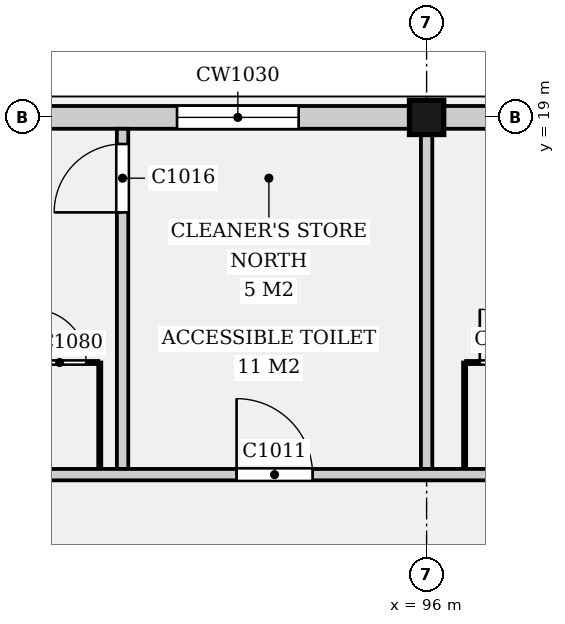
"""IFC4 building model, lengths in metres.
Left out: names, types, materials, properties, quantities, classifications, styles, units other than length and angle.
Written with IfcOpenShell. Run it as: python <this file> out.ifc"""

import sys

from ifc_helpers import new_model, si_unit, direction, frame, frame_2d, origin, origin_2d, place, context, subcontext, project, spatial, rectangle, extrude, element, fill, save


model = new_model("IFC4")
c1 = context("Model", 3, precision=1e-05, world=origin(), true_north=direction((0.0, 1.0)))
c2 = subcontext(c1, "Body", "Model", "MODEL_VIEW")
j1 = project(units=[si_unit("LENGTHUNIT", "METRE"), si_unit("PLANEANGLEUNIT", "RADIAN")], contexts=[c1])
p1 = place(None, origin())
s1 = spatial("IfcSite", under=j1, at=p1, CompositionType="ELEMENT")
p2 = place(p1, origin())
s2 = spatial("IfcBuilding", under=s1, at=p2, CompositionType="ELEMENT")
p3 = place(p2, frame((0.0, 0.0, 5.0)))
s3 = spatial("IfcBuildingStorey", under=s2, at=p3, CompositionType="ELEMENT", Elevation=5.0)
p4 = place(p3, frame((96.0, 19.0, 0.0), z_axis=(0.0, 0.0, 1.0), x_axis=(1.0, 0.0, 0.0)))
e1 = element("IfcColumn", 1, at=p4, inside=s3, PredefinedType="COLUMN", context=c2, shape_type="SweptSolid", body=[
    extrude(rectangle(XDim=0.45, YDim=0.45, at=origin_2d()), origin(), (0.0, 0.0, 1.0), 4.4),
])
p5 = place(p3, frame((84.225, 19.0, 0.0), z_axis=(0.0, 0.0, 1.0), x_axis=(1.0, 0.0, 0.0)))
e2 = element("IfcWall", 2, at=p5, inside=s3, PredefinedType="ELEMENTEDWALL", context=c2, shape_type="SweptSolid", body=[
    extrude(rectangle(XDim=11.55, YDim=0.3, at=frame_2d((5.775, 0.0))), origin(), (0.0, 0.0, 1.0), 3.98),
])
p6 = place(p5, frame((1.458, 0.0, 1.4)))
e3 = element("IfcOpeningElement", 3, at=p6, cuts=e2, PredefinedType="OPENING", context=c2, shape_type="SweptSolid", body=[
    extrude(rectangle(XDim=1.6, YDim=1.2, at=frame_2d((0.8, 0.6))), frame((0.0, 0.16, 0.0), z_axis=(0.0, -1.0, 0.0), x_axis=(1.0, 0.0, 0.0)), (0.0, 0.0, 1.0), 0.32),
])
p7 = place(p5, frame((4.975, 0.0, 1.4)))
e4 = element("IfcOpeningElement", 4, at=p7, cuts=e2, PredefinedType="OPENING", context=c2, shape_type="SweptSolid", body=[
    extrude(rectangle(XDim=1.6, YDim=1.2, at=frame_2d((0.8, 0.6))), frame((0.0, 0.16, 0.0), z_axis=(0.0, -1.0, 0.0), x_axis=(1.0, 0.0, 0.0)), (0.0, 0.0, 1.0), 0.32),
])
p8 = place(p5, frame((8.492, 0.0, 1.4)))
e5 = element("IfcOpeningElement", 5, at=p8, cuts=e2, PredefinedType="OPENING", context=c2, shape_type="SweptSolid", body=[
    extrude(rectangle(XDim=1.6, YDim=1.2, at=frame_2d((0.8, 0.6))), frame((0.0, 0.16, 0.0), z_axis=(0.0, -1.0, 0.0), x_axis=(1.0, 0.0, 0.0)), (0.0, 0.0, 1.0), 0.32),
])
p9 = place(p3, frame((96.225, 19.0, 0.0), z_axis=(0.0, 0.0, 1.0), x_axis=(1.0, 0.0, 0.0)))
e6 = element("IfcWall", 6, at=p9, inside=s3, PredefinedType="ELEMENTEDWALL", context=c2, shape_type="SweptSolid", body=[
    extrude(rectangle(XDim=11.55, YDim=0.3, at=frame_2d((5.775, 0.0))), origin(), (0.0, 0.0, 1.0), 3.98),
])
p10 = place(p9, frame((1.458, 0.0, 1.4)))
e7 = element("IfcOpeningElement", 7, at=p10, cuts=e6, PredefinedType="OPENING", context=c2, shape_type="SweptSolid", body=[
    extrude(rectangle(XDim=1.6, YDim=1.2, at=frame_2d((0.8, 0.6))), frame((0.0, 0.16, 0.0), z_axis=(0.0, -1.0, 0.0), x_axis=(1.0, 0.0, 0.0)), (0.0, 0.0, 1.0), 0.32),
])
p11 = place(p9, frame((4.975, 0.0, 1.4)))
e8 = element("IfcOpeningElement", 8, at=p11, cuts=e6, PredefinedType="OPENING", context=c2, shape_type="SweptSolid", body=[
    extrude(rectangle(XDim=1.6, YDim=1.2, at=frame_2d((0.8, 0.6))), frame((0.0, 0.16, 0.0), z_axis=(0.0, -1.0, 0.0), x_axis=(1.0, 0.0, 0.0)), (0.0, 0.0, 1.0), 0.32),
])
p12 = place(p9, frame((8.492, 0.0, 1.4)))
e9 = element("IfcOpeningElement", 9, at=p12, cuts=e6, PredefinedType="OPENING", context=c2, shape_type="SweptSolid", body=[
    extrude(rectangle(XDim=1.6, YDim=1.2, at=frame_2d((0.8, 0.6))), frame((0.0, 0.16, 0.0), z_axis=(0.0, -1.0, 0.0), x_axis=(1.0, 0.0, 0.0)), (0.0, 0.0, 1.0), 0.32),
])
p13 = place(p3, frame((55.3, 14.3, 0.0), z_axis=(0.0, 0.0, 1.0), x_axis=(1.0, 0.0, 0.0)))
e10 = element("IfcWall", 10, at=p13, inside=s3, PredefinedType="PARTITIONING", context=c2, shape_type="SweptSolid", body=[
    extrude(rectangle(XDim=93.4, YDim=0.15, at=frame_2d((46.7, 0.0))), origin(), (0.0, 0.0, 1.0), 3.98),
])
p14 = place(p13, frame((15.8, 0.0, 0.0)))
e11 = element("IfcOpeningElement", 11, at=p14, cuts=e10, PredefinedType="OPENING", context=c2, shape_type="SweptSolid", body=[
    extrude(rectangle(XDim=1.8, YDim=2.4, at=frame_2d((0.9, 1.2))), frame((0.0, 0.085, 0.0), z_axis=(0.0, -1.0, 0.0), x_axis=(1.0, 0.0, 0.0)), (0.0, 0.0, 1.0), 0.17),
])
p15 = place(p13, frame((32.2, 0.0, 0.0)))
e12 = element("IfcOpeningElement", 12, at=p15, cuts=e10, PredefinedType="OPENING", context=c2, shape_type="SweptSolid", body=[
    extrude(rectangle(XDim=1.0, YDim=2.1, at=frame_2d((0.5, 1.05))), frame((0.0, 0.085, 0.0), z_axis=(0.0, -1.0, 0.0), x_axis=(1.0, 0.0, 0.0)), (0.0, 0.0, 1.0), 0.17),
])
p16 = place(p13, frame((38.2, 0.0, 0.0)))
e13 = element("IfcOpeningElement", 13, at=p16, cuts=e10, PredefinedType="OPENING", context=c2, shape_type="SweptSolid", body=[
    extrude(rectangle(XDim=1.0, YDim=2.1, at=frame_2d((0.5, 1.05))), frame((0.0, 0.085, 0.0), z_axis=(0.0, -1.0, 0.0), x_axis=(1.0, 0.0, 0.0)), (0.0, 0.0, 1.0), 0.17),
])
p17 = place(p13, frame((45.7, 0.0, 0.0)))
e14 = element("IfcOpeningElement", 14, at=p17, cuts=e10, PredefinedType="OPENING", context=c2, shape_type="SweptSolid", body=[
    extrude(rectangle(XDim=0.9, YDim=2.1, at=frame_2d((0.45, 1.05))), frame((0.0, 0.085, 0.0), z_axis=(0.0, -1.0, 0.0), x_axis=(1.0, 0.0, 0.0)), (0.0, 0.0, 1.0), 0.17),
])
p18 = place(p13, frame((58.2, 0.0, 0.0)))
e15 = element("IfcOpeningElement", 15, at=p18, cuts=e10, PredefinedType="OPENING", context=c2, shape_type="SweptSolid", body=[
    extrude(rectangle(XDim=1.0, YDim=2.1, at=frame_2d((0.5, 1.05))), frame((0.0, 0.085, 0.0), z_axis=(0.0, -1.0, 0.0), x_axis=(1.0, 0.0, 0.0)), (0.0, 0.0, 1.0), 0.17),
])
p19 = place(p13, frame((70.2, 0.0, 0.0)))
e16 = element("IfcOpeningElement", 16, at=p19, cuts=e10, PredefinedType="OPENING", context=c2, shape_type="SweptSolid", body=[
    extrude(rectangle(XDim=1.0, YDim=2.1, at=frame_2d((0.5, 1.05))), frame((0.0, 0.085, 0.0), z_axis=(0.0, -1.0, 0.0), x_axis=(1.0, 0.0, 0.0)), (0.0, 0.0, 1.0), 0.17),
])
p20 = place(p13, frame((81.68, 0.0, 0.0)))
e17 = element("IfcOpeningElement", 17, at=p20, cuts=e10, PredefinedType="OPENING", context=c2, shape_type="SweptSolid", body=[
    extrude(rectangle(XDim=0.9, YDim=2.1, at=frame_2d((0.45, 1.05))), frame((0.0, 0.085, 0.0), z_axis=(0.0, -1.0, 0.0), x_axis=(1.0, 0.0, 0.0)), (0.0, 0.0, 1.0), 0.17),
])
p21 = place(p3, frame((92.0, 14.375, 0.0), z_axis=(0.0, 0.0, 1.0), x_axis=(0.0, 1.0, 0.0)))
e18 = element("IfcWall", 18, at=p21, inside=s3, PredefinedType="PARTITIONING", context=c2, shape_type="SweptSolid", body=[
    extrude(rectangle(XDim=4.475, YDim=0.15, at=frame_2d((2.238, 0.0))), origin(), (0.0, 0.0, 1.0), 3.98),
])
p22 = place(p21, frame((3.375, 0.0, 0.0)))
e19 = element("IfcOpeningElement", 19, at=p22, cuts=e18, PredefinedType="OPENING", context=c2, shape_type="SweptSolid", body=[
    extrude(rectangle(XDim=0.9, YDim=2.1, at=frame_2d((0.45, 1.05))), frame((0.0, 0.085, 0.0), z_axis=(0.0, -1.0, 0.0), x_axis=(1.0, 0.0, 0.0)), (0.0, 0.0, 1.0), 0.17),
])
p23 = place(p3, frame((96.0, 14.375, 0.0), z_axis=(0.0, 0.0, 1.0), x_axis=(0.0, 1.0, 0.0)))
e20 = element("IfcWall", 20, at=p23, inside=s3, PredefinedType="PARTITIONING", context=c2, shape_type="SweptSolid", body=[
    extrude(rectangle(XDim=4.4, YDim=0.15, at=frame_2d((2.2, 0.0))), origin(), (0.0, 0.0, 1.0), 3.98),
])
p24 = place(p3, frame((91.7, 14.375, 0.0), z_axis=(0.0, 0.0, 1.0), x_axis=(0.0, 1.0, 0.0)))
e21 = element("IfcWall", 21, at=p24, inside=s3, PredefinedType="PARTITIONING", context=c2, shape_type="SweptSolid", body=[
    extrude(rectangle(XDim=1.4, YDim=0.04, at=frame_2d((0.7, 0.0))), origin(), (0.0, 0.0, 1.0), 2.4),
])
p25 = place(p3, frame((90.663, 15.775, 0.0), z_axis=(0.0, 0.0, 1.0), x_axis=(1.0, 0.0, 0.0)))
e22 = element("IfcWall", 22, at=p25, inside=s3, PredefinedType="PARTITIONING", context=c2, shape_type="SweptSolid", body=[
    extrude(rectangle(XDim=1.017, YDim=0.04, at=frame_2d((0.509, 0.0))), origin(), (0.0, 0.0, 1.0), 2.4),
])
p26 = place(p25, frame((0.159, 0.0, 0.0)))
e23 = element("IfcOpeningElement", 23, at=p26, cuts=e22, PredefinedType="OPENING", context=c2, shape_type="SweptSolid", body=[
    extrude(rectangle(XDim=0.7, YDim=2.0, at=frame_2d((0.35, 1.0))), frame((0.0, 0.03, 0.0), z_axis=(0.0, -1.0, 0.0), x_axis=(1.0, 0.0, 0.0)), (0.0, 0.0, 1.0), 0.06),
])
p27 = place(p3, frame((96.5, 14.375, 0.0), z_axis=(0.0, 0.0, 1.0), x_axis=(0.0, 1.0, 0.0)))
e24 = element("IfcWall", 24, at=p27, inside=s3, PredefinedType="PARTITIONING", context=c2, shape_type="SweptSolid", body=[
    extrude(rectangle(XDim=1.4, YDim=0.04, at=frame_2d((0.7, 0.0))), origin(), (0.0, 0.0, 1.0), 2.4),
])
p28 = place(p3, frame((96.52, 15.775, 0.0), z_axis=(0.0, 0.0, 1.0), x_axis=(1.0, 0.0, 0.0)))
e25 = element("IfcWall", 25, at=p28, inside=s3, PredefinedType="PARTITIONING", context=c2, shape_type="SweptSolid", body=[
    extrude(rectangle(XDim=1.06, YDim=0.04, at=frame_2d((0.53, 0.0))), origin(), (0.0, 0.0, 1.0), 2.4),
])
p29 = place(p28, frame((0.18, 0.0, 0.0)))
e26 = element("IfcOpeningElement", 26, at=p29, cuts=e25, PredefinedType="OPENING", context=c2, shape_type="SweptSolid", body=[
    extrude(rectangle(XDim=0.7, YDim=2.0, at=frame_2d((0.35, 1.0))), frame((0.0, 0.03, 0.0), z_axis=(0.0, -1.0, 0.0), x_axis=(1.0, 0.0, 0.0)), (0.0, 0.0, 1.0), 0.06),
])
p30 = place(p8, origin())
e27 = element("IfcWindow", 27, at=p30, inside=s3, PartitioningType="SINGLE_PANEL", PredefinedType="WINDOW", context=c2, shape_type="SweptSolid", body=[
    extrude(rectangle(XDim=1.6, YDim=1.2, at=frame_2d((0.8, 0.6))), frame((0.0, 0.03, 0.0), z_axis=(0.0, -1.0, 0.0), x_axis=(1.0, 0.0, 0.0)), (0.0, 0.0, 1.0), 0.06),
])
fill(e5, e27)
p31 = place(p16, origin())
e28 = element("IfcDoor", 28, at=p31, inside=s3, OperationType="SINGLE_SWING_LEFT", PredefinedType="DOOR", context=c2, shape_type="SweptSolid", body=[
    extrude(rectangle(XDim=1.0, YDim=2.1, at=frame_2d((0.5, 1.05))), frame((0.0, 0.025, 0.0), z_axis=(0.0, -1.0, 0.0), x_axis=(1.0, 0.0, 0.0)), (0.0, 0.0, 1.0), 0.05),
])
fill(e13, e28)
p32 = place(p22, origin())
e29 = element("IfcDoor", 29, at=p32, inside=s3, OperationType="SINGLE_SWING_LEFT", PredefinedType="DOOR", context=c2, shape_type="SweptSolid", body=[
    extrude(rectangle(XDim=0.9, YDim=2.1, at=frame_2d((0.45, 1.05))), frame((0.0, 0.025, 0.0), z_axis=(0.0, -1.0, 0.0), x_axis=(1.0, 0.0, 0.0)), (0.0, 0.0, 1.0), 0.05),
])
fill(e19, e29)
p33 = place(p26, origin())
e30 = element("IfcDoor", 30, at=p33, inside=s3, OperationType="SINGLE_SWING_LEFT", PredefinedType="DOOR", context=c2, shape_type="SweptSolid", body=[
    extrude(rectangle(XDim=0.7, YDim=2.0, at=frame_2d((0.35, 1.0))), frame((0.0, 0.02, 0.0), z_axis=(0.0, -1.0, 0.0), x_axis=(1.0, 0.0, 0.0)), (0.0, 0.0, 1.0), 0.04),
])
fill(e23, e30)
p34 = place(p29, origin())
e31 = element("IfcDoor", 31, at=p34, inside=s3, OperationType="SINGLE_SWING_LEFT", PredefinedType="DOOR", context=c2, shape_type="SweptSolid", body=[
    extrude(rectangle(XDim=0.7, YDim=2.0, at=frame_2d((0.35, 1.0))), frame((0.0, 0.02, 0.0), z_axis=(0.0, -1.0, 0.0), x_axis=(1.0, 0.0, 0.0)), (0.0, 0.0, 1.0), 0.04),
])
fill(e26, e31)
save(model, sys.argv[1])
